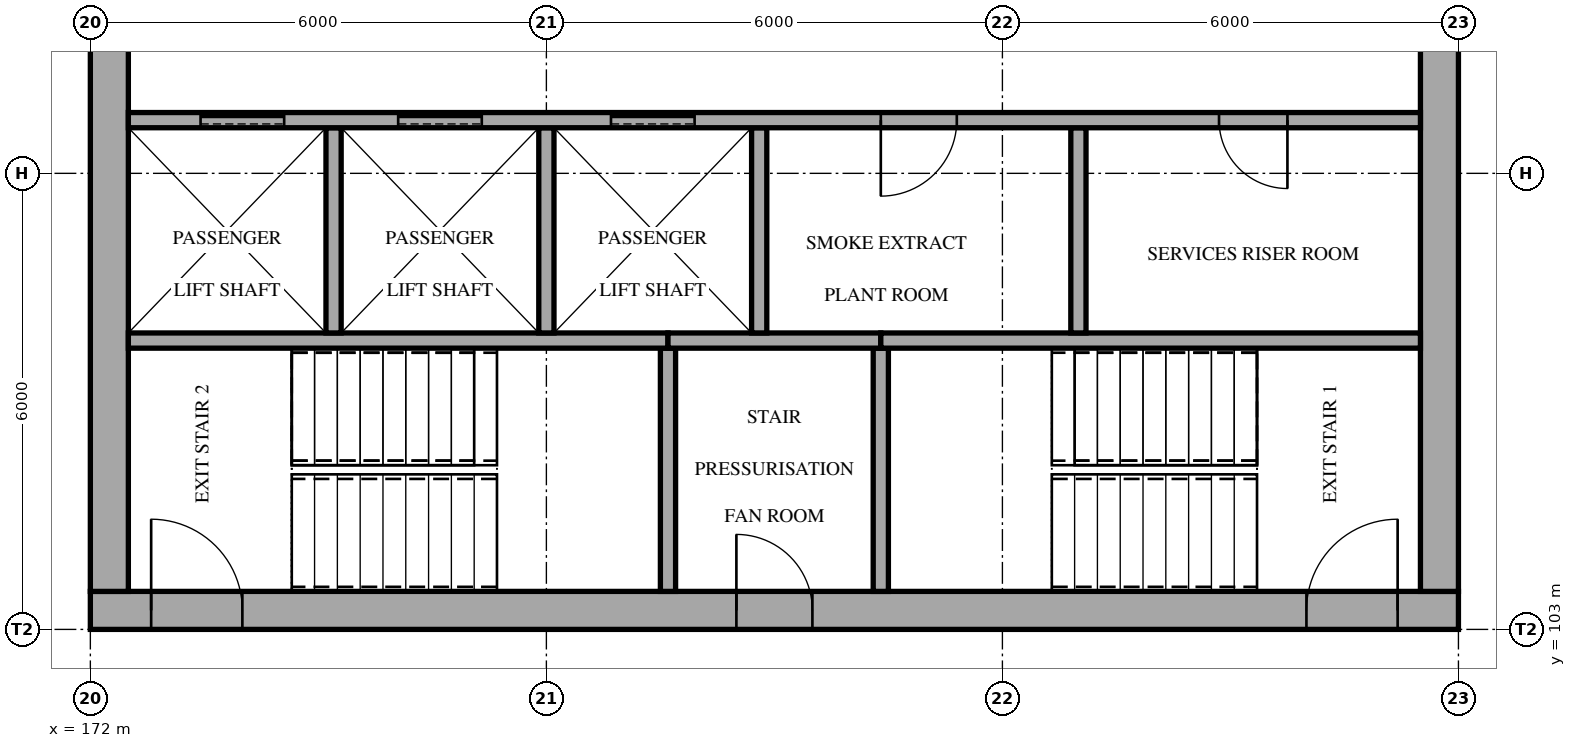
"""IFC4 building model, lengths in metres.
Left out: names, types, materials, properties, quantities, classifications, styles, units other than length and angle.
Written with IfcOpenShell. Run it as: python <this file> out.ifc"""

import sys

from ifc_helpers import new_model, si_unit, direction, frame, frame_2d, origin, place, context, subcontext, project, spatial, rectangle, extrude, element, fill, save


model = new_model("IFC4")
c1 = context("Model", 3, precision=1e-05, world=origin(), true_north=direction((0.0, 1.0)))
c2 = subcontext(c1, "Body", "Model", "MODEL_VIEW")
j1 = project(units=[si_unit("LENGTHUNIT", "METRE"), si_unit("PLANEANGLEUNIT", "RADIAN")], contexts=[c1])
p1 = place(None, origin())
s1 = spatial("IfcSite", under=j1, at=p1, CompositionType="ELEMENT")
p2 = place(p1, origin())
s2 = spatial("IfcBuilding", under=s1, at=p2, CompositionType="ELEMENT")
p3 = place(p2, frame((0.0, 0.0, 15.0)))
s3 = spatial("IfcBuildingStorey", under=s2, at=p3, CompositionType="ELEMENT", Elevation=15.0)
p4 = place(p3, frame((172.0, 103.25, 0.0), z_axis=(0.0, 0.0, 1.0), x_axis=(1.0, 0.0, 0.0)))
e1 = element("IfcWall", 1, at=p4, inside=s3, PredefinedType="SHEAR", context=c2, shape_type="SweptSolid", body=[
    extrude(rectangle(XDim=18.0, YDim=0.5, at=frame_2d((9.0, 0.0))), origin(), (0.0, 0.0, 1.0), 4.2),
])
p5 = place(p4, frame((8.5, 0.0, 0.0)))
e2 = element("IfcOpeningElement", 2, at=p5, cuts=e1, PredefinedType="OPENING", context=c2, shape_type="SweptSolid", body=[
    extrude(rectangle(XDim=1.0, YDim=2.1, at=frame_2d((0.5, 1.05))), frame((0.0, 0.26, 0.0), z_axis=(0.0, -1.0, 0.0), x_axis=(1.0, 0.0, 0.0)), (0.0, 0.0, 1.0), 0.52),
])
p6 = place(p4, frame((0.8, 0.0, 0.0)))
e3 = element("IfcOpeningElement", 3, at=p6, cuts=e1, PredefinedType="OPENING", context=c2, shape_type="SweptSolid", body=[
    extrude(rectangle(XDim=1.2, YDim=2.1, at=frame_2d((0.6, 1.05))), frame((0.0, 0.26, 0.0), z_axis=(0.0, -1.0, 0.0), x_axis=(1.0, 0.0, 0.0)), (0.0, 0.0, 1.0), 0.52),
])
p7 = place(p4, frame((16.0, 0.0, 0.0)))
e4 = element("IfcOpeningElement", 4, at=p7, cuts=e1, PredefinedType="OPENING", context=c2, shape_type="SweptSolid", body=[
    extrude(rectangle(XDim=1.2, YDim=2.1, at=frame_2d((0.6, 1.05))), frame((0.0, 0.26, 0.0), z_axis=(0.0, -1.0, 0.0), x_axis=(1.0, 0.0, 0.0)), (0.0, 0.0, 1.0), 0.52),
])
p8 = place(p3, frame((172.25, 103.5, 0.0), z_axis=(0.0, 0.0, 1.0), x_axis=(0.0, 1.0, 0.0)))
e5 = element("IfcWall", 5, at=p8, inside=s3, PredefinedType="SHEAR", context=c2, shape_type="SweptSolid", body=[
    extrude(rectangle(XDim=17.0, YDim=0.5, at=frame_2d((8.5, 0.0))), origin(), (0.0, 0.0, 1.0), 4.2),
])
p9 = place(p8, frame((7.2, 0.0, 0.0)))
e6 = element("IfcOpeningElement", 6, at=p9, cuts=e5, PredefinedType="OPENING", context=c2, shape_type="SweptSolid", body=[
    extrude(rectangle(XDim=1.4, YDim=2.1, at=frame_2d((0.7, 1.05))), frame((0.0, 0.26, 0.0), z_axis=(0.0, -1.0, 0.0), x_axis=(1.0, 0.0, 0.0)), (0.0, 0.0, 1.0), 0.52),
])
p10 = place(p3, frame((189.75, 103.5, 0.0), z_axis=(0.0, 0.0, 1.0), x_axis=(0.0, 1.0, 0.0)))
e7 = element("IfcWall", 7, at=p10, inside=s3, PredefinedType="SHEAR", context=c2, shape_type="SweptSolid", body=[
    extrude(rectangle(XDim=17.0, YDim=0.5, at=frame_2d((8.5, 0.0))), origin(), (0.0, 0.0, 1.0), 4.2),
])
p11 = place(p10, frame((7.2, 0.0, 0.0)))
e8 = element("IfcOpeningElement", 8, at=p11, cuts=e7, PredefinedType="OPENING", context=c2, shape_type="SweptSolid", body=[
    extrude(rectangle(XDim=1.4, YDim=2.1, at=frame_2d((0.7, 1.05))), frame((0.0, 0.26, 0.0), z_axis=(0.0, -1.0, 0.0), x_axis=(1.0, 0.0, 0.0)), (0.0, 0.0, 1.0), 0.52),
])
for number, where, z_axis, x_axis in (
    (9, (179.6, 103.5, 0.0), (0.0, 0.0, 1.0), (0.0, 1.0, 0.0)),
    (10, (182.4, 103.5, 0.0), (0.0, 0.0, 1.0), (0.0, 1.0, 0.0)),
):
    element("IfcWall", number, at=place(p3, frame(where, z_axis=z_axis, x_axis=x_axis)), inside=s3, PredefinedType="SOLIDWALL", context=c2, shape_type="SweptSolid", body=[
        extrude(rectangle(XDim=3.2, YDim=0.2, at=frame_2d((1.6, 0.0))), origin(), (0.0, 0.0, 1.0), 4.0),
    ])
p12 = place(p3, frame((172.5, 106.8, 0.0), z_axis=(0.0, 0.0, 1.0), x_axis=(1.0, 0.0, 0.0)))
e11 = element("IfcWall", 11, at=p12, inside=s3, PredefinedType="SOLIDWALL", context=c2, shape_type="SweptSolid", body=[
    extrude(rectangle(XDim=7.1, YDim=0.2, at=frame_2d((3.55, 0.0))), origin(), (0.0, 0.0, 1.0), 4.0),
])
p13 = place(p3, frame((179.6, 106.8, 0.0), z_axis=(0.0, 0.0, 1.0), x_axis=(1.0, 0.0, 0.0)))
e12 = element("IfcWall", 12, at=p13, inside=s3, PredefinedType="SOLIDWALL", context=c2, shape_type="SweptSolid", body=[
    extrude(rectangle(XDim=2.8, YDim=0.2, at=frame_2d((1.4, 0.0))), origin(), (0.0, 0.0, 1.0), 4.0),
])
p14 = place(p3, frame((182.4, 106.8, 0.0), z_axis=(0.0, 0.0, 1.0), x_axis=(1.0, 0.0, 0.0)))
e13 = element("IfcWall", 13, at=p14, inside=s3, PredefinedType="SOLIDWALL", context=c2, shape_type="SweptSolid", body=[
    extrude(rectangle(XDim=7.1, YDim=0.2, at=frame_2d((3.55, 0.0))), origin(), (0.0, 0.0, 1.0), 4.0),
])
for number, where, z_axis, x_axis in (
    (14, (175.2, 106.9, 0.0), (0.0, 0.0, 1.0), (0.0, 1.0, 0.0)),
    (15, (178.0, 106.9, 0.0), (0.0, 0.0, 1.0), (0.0, 1.0, 0.0)),
    (16, (180.8, 106.9, 0.0), (0.0, 0.0, 1.0), (0.0, 1.0, 0.0)),
    (17, (185.0, 106.9, 0.0), (0.0, 0.0, 1.0), (0.0, 1.0, 0.0)),
):
    element("IfcWall", number, at=place(p3, frame(where, z_axis=z_axis, x_axis=x_axis)), inside=s3, PredefinedType="SOLIDWALL", context=c2, shape_type="SweptSolid", body=[
        extrude(rectangle(XDim=2.7, YDim=0.2, at=frame_2d((1.35, 0.0))), origin(), (0.0, 0.0, 1.0), 4.0),
    ])
p15 = place(p3, frame((172.5, 109.7, 0.0), z_axis=(0.0, 0.0, 1.0), x_axis=(1.0, 0.0, 0.0)))
e18 = element("IfcWall", 18, at=p15, inside=s3, PredefinedType="SOLIDWALL", context=c2, shape_type="SweptSolid", body=[
    extrude(rectangle(XDim=17.0, YDim=0.2, at=frame_2d((8.5, 0.0))), origin(), (0.0, 0.0, 1.0), 4.0),
])
p16 = place(p15, frame((0.95, 0.0, 0.0)))
e19 = element("IfcOpeningElement", 19, at=p16, cuts=e18, PredefinedType="OPENING", context=c2, shape_type="SweptSolid", body=[
    extrude(rectangle(XDim=1.1, YDim=2.1, at=frame_2d((0.55, 1.05))), frame((0.0, 0.11, 0.0), z_axis=(0.0, -1.0, 0.0), x_axis=(1.0, 0.0, 0.0)), (0.0, 0.0, 1.0), 0.22),
])
p17 = place(p15, frame((3.55, 0.0, 0.0)))
e20 = element("IfcOpeningElement", 20, at=p17, cuts=e18, PredefinedType="OPENING", context=c2, shape_type="SweptSolid", body=[
    extrude(rectangle(XDim=1.1, YDim=2.1, at=frame_2d((0.55, 1.05))), frame((0.0, 0.11, 0.0), z_axis=(0.0, -1.0, 0.0), x_axis=(1.0, 0.0, 0.0)), (0.0, 0.0, 1.0), 0.22),
])
p18 = place(p15, frame((6.35, 0.0, 0.0)))
e21 = element("IfcOpeningElement", 21, at=p18, cuts=e18, PredefinedType="OPENING", context=c2, shape_type="SweptSolid", body=[
    extrude(rectangle(XDim=1.1, YDim=2.1, at=frame_2d((0.55, 1.05))), frame((0.0, 0.11, 0.0), z_axis=(0.0, -1.0, 0.0), x_axis=(1.0, 0.0, 0.0)), (0.0, 0.0, 1.0), 0.22),
])
p19 = place(p15, frame((9.9, 0.0, 0.0)))
e22 = element("IfcOpeningElement", 22, at=p19, cuts=e18, PredefinedType="OPENING", context=c2, shape_type="SweptSolid", body=[
    extrude(rectangle(XDim=1.0, YDim=2.1, at=frame_2d((0.5, 1.05))), frame((0.0, 0.11, 0.0), z_axis=(0.0, -1.0, 0.0), x_axis=(1.0, 0.0, 0.0)), (0.0, 0.0, 1.0), 0.22),
])
p20 = place(p15, frame((14.35, 0.0, 0.0)))
e23 = element("IfcOpeningElement", 23, at=p20, cuts=e18, PredefinedType="OPENING", context=c2, shape_type="SweptSolid", body=[
    extrude(rectangle(XDim=0.9, YDim=2.1, at=frame_2d((0.45, 1.05))), frame((0.0, 0.11, 0.0), z_axis=(0.0, -1.0, 0.0), x_axis=(1.0, 0.0, 0.0)), (0.0, 0.0, 1.0), 0.22),
])
p21 = place(p5, origin())
e24 = element("IfcDoor", 24, at=p21, inside=s3, OperationType="SINGLE_SWING_LEFT", PredefinedType="DOOR", context=c2, shape_type="SweptSolid", body=[
    extrude(rectangle(XDim=1.0, YDim=2.1, at=frame_2d((0.5, 1.05))), frame((0.0, 0.025, 0.0), z_axis=(0.0, -1.0, 0.0), x_axis=(1.0, 0.0, 0.0)), (0.0, 0.0, 1.0), 0.05),
])
fill(e2, e24)
p22 = place(p16, origin())
e25 = element("IfcDoor", 25, at=p22, inside=s3, OperationType="SLIDING_TO_LEFT", PredefinedType="DOOR", context=c2, shape_type="SweptSolid", body=[
    extrude(rectangle(XDim=1.1, YDim=2.1, at=frame_2d((0.55, 1.05))), frame((0.0, 0.025, 0.0), z_axis=(0.0, -1.0, 0.0), x_axis=(1.0, 0.0, 0.0)), (0.0, 0.0, 1.0), 0.05),
])
fill(e19, e25)
p23 = place(p17, origin())
e26 = element("IfcDoor", 26, at=p23, inside=s3, OperationType="SLIDING_TO_LEFT", PredefinedType="DOOR", context=c2, shape_type="SweptSolid", body=[
    extrude(rectangle(XDim=1.1, YDim=2.1, at=frame_2d((0.55, 1.05))), frame((0.0, 0.025, 0.0), z_axis=(0.0, -1.0, 0.0), x_axis=(1.0, 0.0, 0.0)), (0.0, 0.0, 1.0), 0.05),
])
fill(e20, e26)
p24 = place(p18, origin())
e27 = element("IfcDoor", 27, at=p24, inside=s3, OperationType="SLIDING_TO_LEFT", PredefinedType="DOOR", context=c2, shape_type="SweptSolid", body=[
    extrude(rectangle(XDim=1.1, YDim=2.1, at=frame_2d((0.55, 1.05))), frame((0.0, 0.025, 0.0), z_axis=(0.0, -1.0, 0.0), x_axis=(1.0, 0.0, 0.0)), (0.0, 0.0, 1.0), 0.05),
])
fill(e21, e27)
p25 = place(p19, frame((1.0, 0.0, 0.0), z_axis=(0.0, 0.0, 1.0), x_axis=(-1.0, 0.0, 0.0)))
e28 = element("IfcDoor", 28, at=p25, inside=s3, OperationType="SINGLE_SWING_RIGHT", PredefinedType="DOOR", context=c2, shape_type="SweptSolid", body=[
    extrude(rectangle(XDim=1.0, YDim=2.1, at=frame_2d((0.5, 1.05))), frame((0.0, 0.025, 0.0), z_axis=(0.0, -1.0, 0.0), x_axis=(1.0, 0.0, 0.0)), (0.0, 0.0, 1.0), 0.05),
])
fill(e22, e28)
p26 = place(p20, frame((0.9, 0.0, 0.0), z_axis=(0.0, 0.0, 1.0), x_axis=(-1.0, 0.0, 0.0)))
e29 = element("IfcDoor", 29, at=p26, inside=s3, OperationType="SINGLE_SWING_LEFT", PredefinedType="DOOR", context=c2, shape_type="SweptSolid", body=[
    extrude(rectangle(XDim=0.9, YDim=2.1, at=frame_2d((0.45, 1.05))), frame((0.0, 0.025, 0.0), z_axis=(0.0, -1.0, 0.0), x_axis=(1.0, 0.0, 0.0)), (0.0, 0.0, 1.0), 0.05),
])
fill(e23, e29)
p27 = place(p6, origin())
e30 = element("IfcDoor", 30, at=p27, inside=s3, OperationType="SINGLE_SWING_LEFT", PredefinedType="DOOR", context=c2, shape_type="SweptSolid", body=[
    extrude(rectangle(XDim=1.2, YDim=2.1, at=frame_2d((0.6, 1.05))), frame((0.0, 0.025, 0.0), z_axis=(0.0, -1.0, 0.0), x_axis=(1.0, 0.0, 0.0)), (0.0, 0.0, 1.0), 0.05),
])
fill(e3, e30)
p28 = place(p7, origin())
e31 = element("IfcDoor", 31, at=p28, inside=s3, OperationType="SINGLE_SWING_RIGHT", PredefinedType="DOOR", context=c2, shape_type="SweptSolid", body=[
    extrude(rectangle(XDim=1.2, YDim=2.1, at=frame_2d((0.6, 1.05))), frame((0.0, 0.025, 0.0), z_axis=(0.0, -1.0, 0.0), x_axis=(1.0, 0.0, 0.0)), (0.0, 0.0, 1.0), 0.05),
])
fill(e4, e31)
save(model, sys.argv[1])
